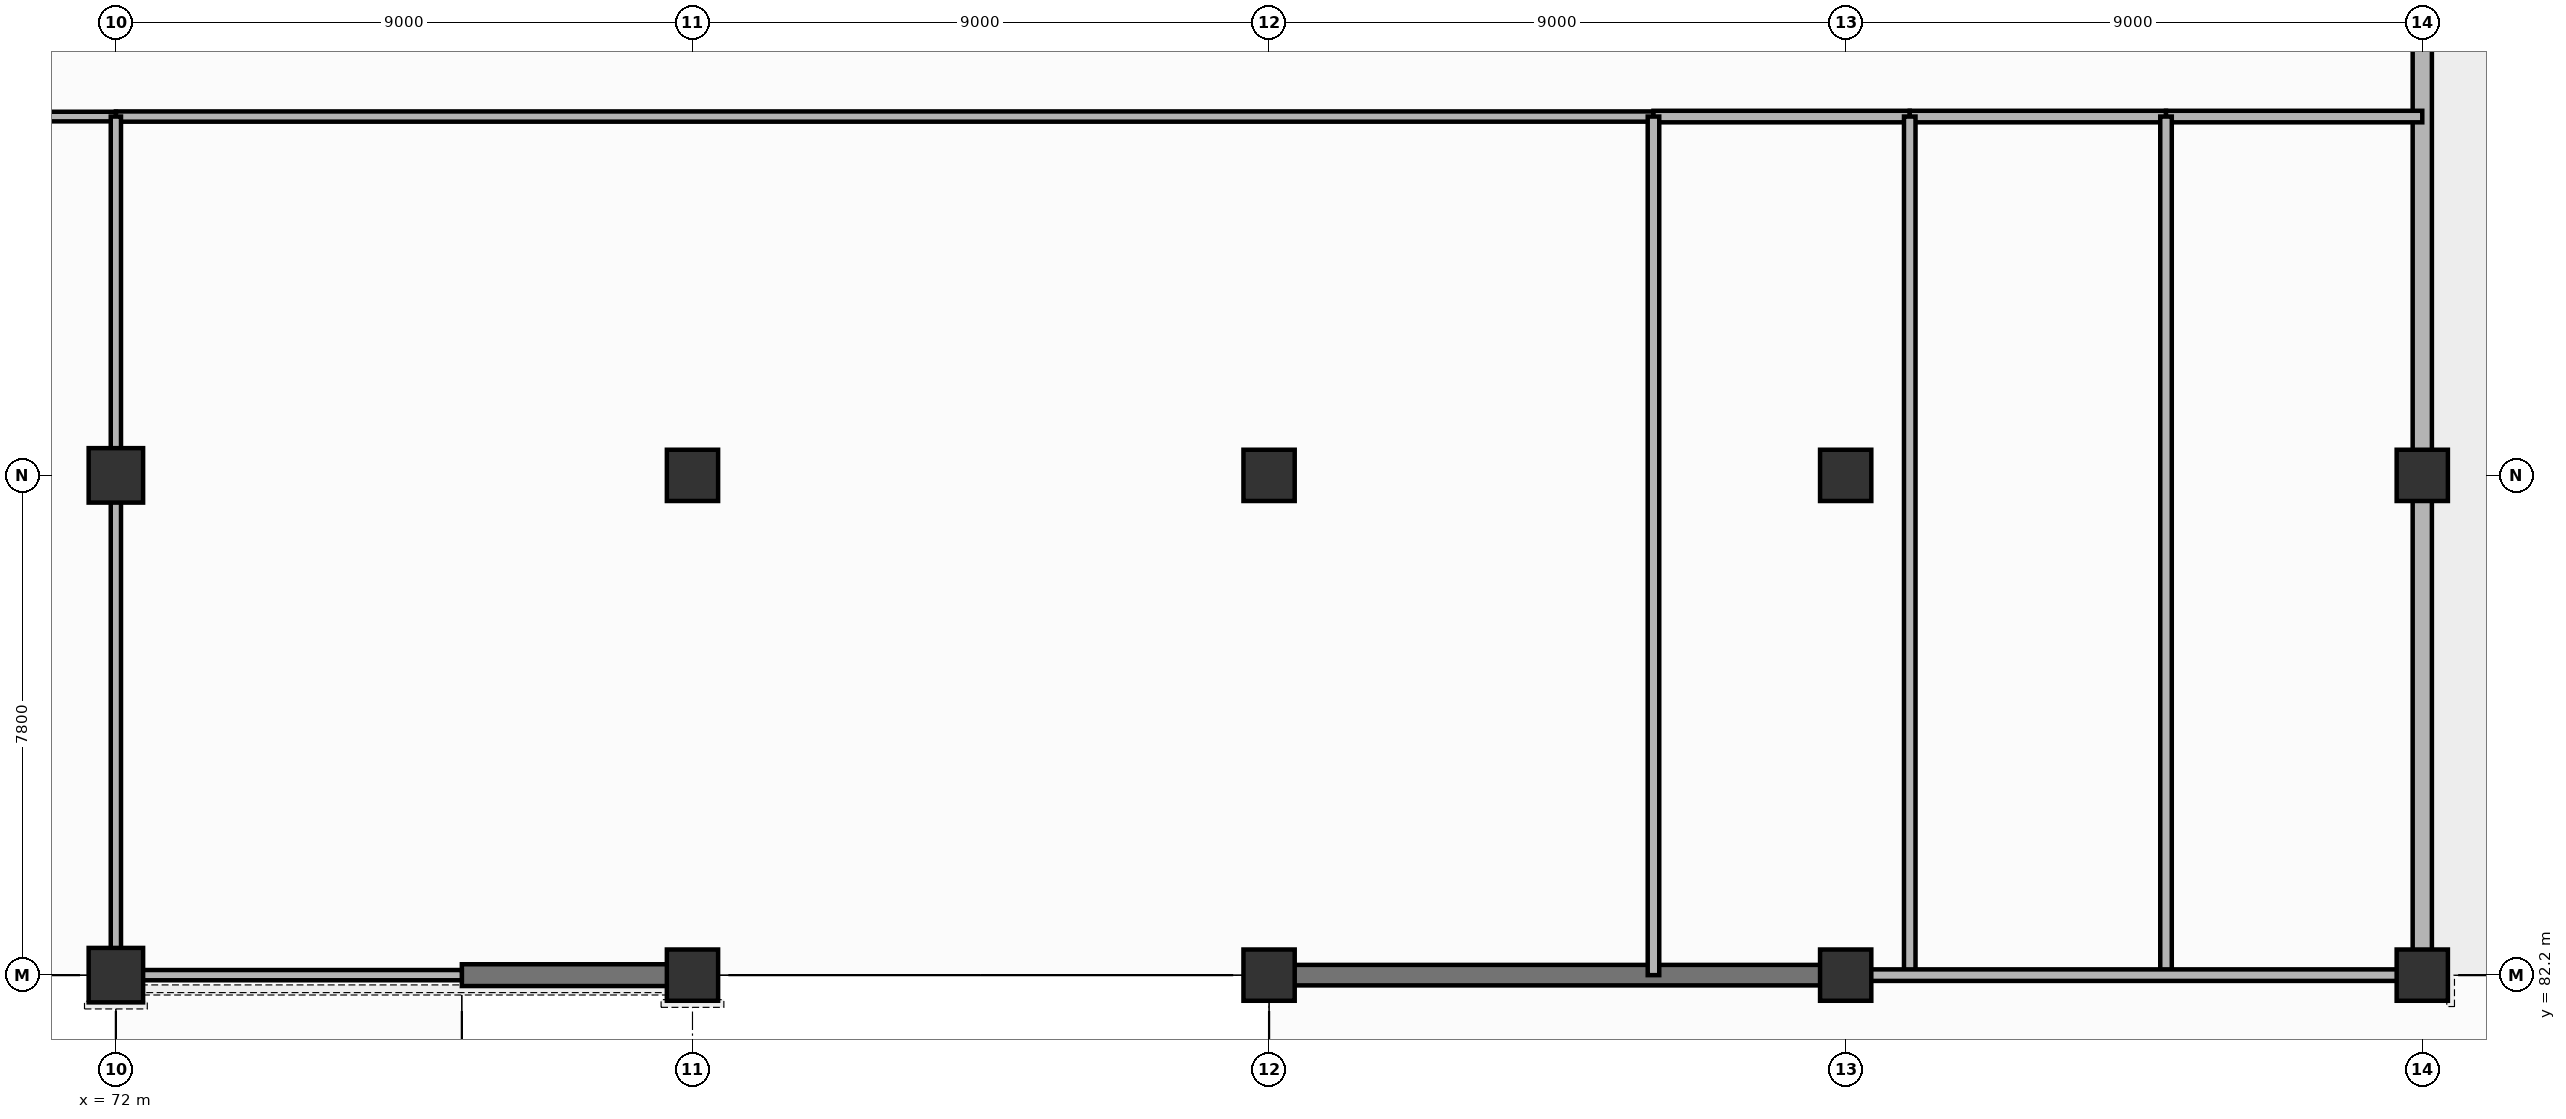
"""IFC4 building model, lengths in metres.
Left out: names, types, materials, properties, quantities, classifications, styles, units other than length and angle.
Written with IfcOpenShell. Run it as: python <this file> out.ifc"""

import sys

from ifc_helpers import new_model, si_unit, direction, frame, frame_2d, origin, origin_2d, place, context, subcontext, project, spatial, rectangle, extrude, element, fill, save


model = new_model("IFC4")
c1 = context("Model", 3, precision=1e-05, world=origin(), true_north=direction((0.0, 1.0)))
c2 = subcontext(c1, "Body", "Model", "MODEL_VIEW")
j1 = project(units=[si_unit("LENGTHUNIT", "METRE"), si_unit("PLANEANGLEUNIT", "RADIAN")], contexts=[c1])
p1 = place(None, origin())
s1 = spatial("IfcSite", under=j1, at=p1, CompositionType="ELEMENT")
p2 = place(p1, origin())
s2 = spatial("IfcBuilding", under=s1, at=p2, CompositionType="ELEMENT")
p3 = place(p2, frame((0.0, 0.0, 5.1)))
s3 = spatial("IfcBuildingStorey", under=s2, at=p3, CompositionType="ELEMENT", Elevation=5.1)
for number, where, z_axis, x_axis in (
    (1, (72.0, 82.2, 0.0), (0.0, 0.0, 1.0), (1.0, 0.0, 0.0)),
    (2, (72.0, 90.0, 0.0), (0.0, 0.0, 1.0), (1.0, 0.0, 0.0)),
):
    element("IfcColumn", number, at=place(p3, frame(where, z_axis=z_axis, x_axis=x_axis)), inside=s3, PredefinedType="COLUMN", context=c2, shape_type="SweptSolid", body=[
        extrude(rectangle(XDim=0.85, YDim=0.85, at=origin_2d()), origin(), (0.0, 0.0, 1.0), 3.84),
    ])
for number, where, z_axis, x_axis in (
    (3, (81.0, 82.2, 0.0), (0.0, 0.0, 1.0), (1.0, 0.0, 0.0)),
    (4, (81.0, 90.0, 0.0), (0.0, 0.0, 1.0), (1.0, 0.0, 0.0)),
    (5, (90.0, 82.2, 0.0), (0.0, 0.0, 1.0), (1.0, 0.0, 0.0)),
    (6, (90.0, 90.0, 0.0), (0.0, 0.0, 1.0), (1.0, 0.0, 0.0)),
    (7, (99.0, 82.2, 0.0), (0.0, 0.0, 1.0), (1.0, 0.0, 0.0)),
    (8, (99.0, 90.0, 0.0), (0.0, 0.0, 1.0), (1.0, 0.0, 0.0)),
    (9, (108.0, 82.2, 0.0), (0.0, 0.0, 1.0), (1.0, 0.0, 0.0)),
    (10, (108.0, 90.0, 0.0), (0.0, 0.0, 1.0), (1.0, 0.0, 0.0)),
):
    element("IfcColumn", number, at=place(p3, frame(where, z_axis=z_axis, x_axis=x_axis)), inside=s3, PredefinedType="COLUMN", context=c2, shape_type="SweptSolid", body=[
        extrude(rectangle(XDim=0.8, YDim=0.8, at=origin_2d()), origin(), (0.0, 0.0, 1.0), 3.84),
    ])
p4 = place(p3, frame((77.4, 82.2, 0.0), z_axis=(0.0, 0.0, 1.0), x_axis=(1.0, 0.0, 0.0)))
e11 = element("IfcWall", 11, at=p4, inside=s3, PredefinedType="SOLIDWALL", context=c2, shape_type="SweptSolid", body=[
    extrude(rectangle(XDim=3.6, YDim=0.34, at=frame_2d((1.8, 0.0))), origin(), (0.0, 0.0, 1.0), 3.55),
])
p5 = place(p3, frame((108.0, 82.2, 0.0), z_axis=(0.0, 0.0, 1.0), x_axis=(0.0, 1.0, 0.0)))
e12 = element("IfcWall", 12, at=p5, inside=s3, PredefinedType="SOLIDWALL", context=c2, shape_type="SweptSolid", body=[
    extrude(rectangle(XDim=31.8, YDim=0.3, at=frame_2d((15.9, 0.0))), origin(), (0.0, 0.0, 1.0), 2.815),
])
p6 = place(p5, frame((3.2, 0.0, 0.595)))
e13 = element("IfcOpeningElement", 13, at=p6, cuts=e12, PredefinedType="OPENING", context=c2, shape_type="SweptSolid", body=[
    extrude(rectangle(XDim=1.5, YDim=2.1, at=frame_2d((0.75, 1.05))), frame((0.0, 0.16, 0.0), z_axis=(0.0, -1.0, 0.0), x_axis=(1.0, 0.0, 0.0)), (0.0, 0.0, 1.0), 0.32),
])
p7 = place(p5, frame((10.5, 0.0, 0.845)))
e14 = element("IfcOpeningElement", 14, at=p7, cuts=e12, PredefinedType="OPENING", context=c2, shape_type="SweptSolid", body=[
    extrude(rectangle(XDim=1.35, YDim=1.85, at=frame_2d((0.675, 0.925))), frame((0.0, 0.16, 0.0), z_axis=(0.0, -1.0, 0.0), x_axis=(1.0, 0.0, 0.0)), (0.0, 0.0, 1.0), 0.32),
])
p8 = place(p3, frame((90.0, 82.2, 0.0), z_axis=(0.0, 0.0, 1.0), x_axis=(1.0, 0.0, 0.0)))
e15 = element("IfcWall", 15, at=p8, inside=s3, PredefinedType="SHEAR", context=c2, shape_type="SweptSolid", body=[
    extrude(rectangle(XDim=9.0, YDim=0.32, at=frame_2d((4.5, 0.0))), origin(), (0.0, 0.0, 1.0), 3.55),
])
p9 = place(p8, frame((3.75, 0.0, 0.0)))
e16 = element("IfcOpeningElement", 16, at=p9, cuts=e15, PredefinedType="OPENING", context=c2, shape_type="SweptSolid", body=[
    extrude(rectangle(XDim=1.5, YDim=2.2, at=frame_2d((0.75, 1.1))), frame((0.0, 0.17, 0.0), z_axis=(0.0, -1.0, 0.0), x_axis=(1.0, 0.0, 0.0)), (0.0, 0.0, 1.0), 0.34),
])
p10 = place(p3, frame((54.0, 95.6, 0.0), z_axis=(0.0, 0.0, 1.0), x_axis=(1.0, 0.0, 0.0)))
e17 = element("IfcWall", 17, at=p10, inside=s3, PredefinedType="PARTITIONING", context=c2, shape_type="SweptSolid", body=[
    extrude(rectangle(XDim=18.0, YDim=0.15, at=frame_2d((9.0, 0.0))), origin(), (0.0, 0.0, 1.0), 2.735),
])
p11 = place(p10, frame((8.5, 0.0, 0.0)))
e18 = element("IfcOpeningElement", 18, at=p11, cuts=e17, PredefinedType="OPENING", context=c2, shape_type="SweptSolid", body=[
    extrude(rectangle(XDim=1.6, YDim=2.2, at=frame_2d((0.8, 1.1))), frame((0.0, 0.085, 0.0), z_axis=(0.0, -1.0, 0.0), x_axis=(1.0, 0.0, 0.0)), (0.0, 0.0, 1.0), 0.17),
])
p12 = place(p3, frame((72.0, 95.6, 0.0), z_axis=(0.0, 0.0, 1.0), x_axis=(1.0, 0.0, 0.0)))
e19 = element("IfcWall", 19, at=p12, inside=s3, PredefinedType="PARTITIONING", context=c2, shape_type="SweptSolid", body=[
    extrude(rectangle(XDim=24.0, YDim=0.16, at=frame_2d((12.0, 0.0))), origin(), (0.0, 0.0, 1.0), 3.55),
])
p13 = place(p12, frame((11.5, 0.0, 0.0)))
e20 = element("IfcOpeningElement", 20, at=p13, cuts=e19, PredefinedType="OPENING", context=c2, shape_type="SweptSolid", body=[
    extrude(rectangle(XDim=1.6, YDim=2.2, at=frame_2d((0.8, 1.1))), frame((0.0, 0.09, 0.0), z_axis=(0.0, -1.0, 0.0), x_axis=(1.0, 0.0, 0.0)), (0.0, 0.0, 1.0), 0.18),
])
p14 = place(p3, frame((72.0, 82.2, 0.0), z_axis=(0.0, 0.0, 1.0), x_axis=(0.0, 1.0, 0.0)))
e21 = element("IfcWall", 21, at=p14, inside=s3, PredefinedType="PARTITIONING", context=c2, shape_type="SweptSolid", body=[
    extrude(rectangle(XDim=13.4, YDim=0.16, at=frame_2d((6.7, 0.0))), origin(), (0.0, 0.0, 1.0), 2.855),
])
p15 = place(p3, frame((96.0, 95.6, 0.0), z_axis=(0.0, 0.0, 1.0), x_axis=(1.0, 0.0, 0.0)))
e22 = element("IfcWall", 22, at=p15, inside=s3, PredefinedType="PLUMBINGWALL", context=c2, shape_type="SweptSolid", body=[
    extrude(rectangle(XDim=4.0, YDim=0.18, at=frame_2d((2.0, 0.0))), origin(), (0.0, 0.0, 1.0), 3.55),
])
p16 = place(p15, frame((1.5, 0.0, 0.0)))
e23 = element("IfcOpeningElement", 23, at=p16, cuts=e22, PredefinedType="OPENING", context=c2, shape_type="SweptSolid", body=[
    extrude(rectangle(XDim=0.95, YDim=2.15, at=frame_2d((0.475, 1.075))), frame((0.0, 0.1, 0.0), z_axis=(0.0, -1.0, 0.0), x_axis=(1.0, 0.0, 0.0)), (0.0, 0.0, 1.0), 0.2),
])
p17 = place(p3, frame((96.0, 82.2, 0.0), z_axis=(0.0, 0.0, 1.0), x_axis=(0.0, 1.0, 0.0)))
e24 = element("IfcWall", 24, at=p17, inside=s3, PredefinedType="PLUMBINGWALL", context=c2, shape_type="SweptSolid", body=[
    extrude(rectangle(XDim=13.4, YDim=0.18, at=frame_2d((6.7, 0.0))), origin(), (0.0, 0.0, 1.0), 3.55),
])
p18 = place(p3, frame((100.0, 95.6, 0.0), z_axis=(0.0, 0.0, 1.0), x_axis=(1.0, 0.0, 0.0)))
e25 = element("IfcWall", 25, at=p18, inside=s3, PredefinedType="PLUMBINGWALL", context=c2, shape_type="SweptSolid", body=[
    extrude(rectangle(XDim=4.0, YDim=0.18, at=frame_2d((2.0, 0.0))), origin(), (0.0, 0.0, 1.0), 3.55),
])
p19 = place(p18, frame((1.5, 0.0, 0.0)))
e26 = element("IfcOpeningElement", 26, at=p19, cuts=e25, PredefinedType="OPENING", context=c2, shape_type="SweptSolid", body=[
    extrude(rectangle(XDim=0.95, YDim=2.15, at=frame_2d((0.475, 1.075))), frame((0.0, 0.1, 0.0), z_axis=(0.0, -1.0, 0.0), x_axis=(1.0, 0.0, 0.0)), (0.0, 0.0, 1.0), 0.2),
])
p20 = place(p3, frame((100.0, 82.2, 0.0), z_axis=(0.0, 0.0, 1.0), x_axis=(0.0, 1.0, 0.0)))
e27 = element("IfcWall", 27, at=p20, inside=s3, PredefinedType="PLUMBINGWALL", context=c2, shape_type="SweptSolid", body=[
    extrude(rectangle(XDim=13.4, YDim=0.18, at=frame_2d((6.7, 0.0))), origin(), (0.0, 0.0, 1.0), 3.55),
])
p21 = place(p3, frame((104.0, 95.6, 0.0), z_axis=(0.0, 0.0, 1.0), x_axis=(1.0, 0.0, 0.0)))
e28 = element("IfcWall", 28, at=p21, inside=s3, PredefinedType="PLUMBINGWALL", context=c2, shape_type="SweptSolid", body=[
    extrude(rectangle(XDim=4.0, YDim=0.18, at=frame_2d((2.0, 0.0))), origin(), (0.0, 0.0, 1.0), 3.55),
])
p22 = place(p21, frame((1.5, 0.0, 0.0)))
e29 = element("IfcOpeningElement", 29, at=p22, cuts=e28, PredefinedType="OPENING", context=c2, shape_type="SweptSolid", body=[
    extrude(rectangle(XDim=0.95, YDim=2.15, at=frame_2d((0.475, 1.075))), frame((0.0, 0.1, 0.0), z_axis=(0.0, -1.0, 0.0), x_axis=(1.0, 0.0, 0.0)), (0.0, 0.0, 1.0), 0.2),
])
p23 = place(p3, frame((104.0, 82.2, 0.0), z_axis=(0.0, 0.0, 1.0), x_axis=(0.0, 1.0, 0.0)))
e30 = element("IfcWall", 30, at=p23, inside=s3, PredefinedType="PLUMBINGWALL", context=c2, shape_type="SweptSolid", body=[
    extrude(rectangle(XDim=13.4, YDim=0.18, at=frame_2d((6.7, 0.0))), origin(), (0.0, 0.0, 1.0), 3.55),
])
p24 = place(p3, frame((99.0, 82.2, 0.0), z_axis=(0.0, 0.0, 1.0), x_axis=(1.0, 0.0, 0.0)))
e31 = element("IfcWall", 31, at=p24, inside=s3, PredefinedType="PLUMBINGWALL", context=c2, shape_type="SweptSolid", body=[
    extrude(rectangle(XDim=9.0, YDim=0.18, at=frame_2d((4.5, 0.0))), origin(), (0.0, 0.0, 1.0), 2.873),
])
p25 = place(p3, frame((72.0, 82.2, 0.0), z_axis=(0.0, 0.0, 1.0), x_axis=(1.0, 0.0, 0.0)))
e32 = element("IfcWall", 32, at=p25, inside=s3, PredefinedType="PARTITIONING", context=c2, shape_type="SweptSolid", body=[
    extrude(rectangle(XDim=5.4, YDim=0.16, at=frame_2d((2.7, 0.0))), origin(), (0.0, 0.0, 1.0), 2.855),
])
p26 = place(p25, frame((1.9, 0.0, 0.0)))
e33 = element("IfcOpeningElement", 33, at=p26, cuts=e32, PredefinedType="OPENING", context=c2, shape_type="SweptSolid", body=[
    extrude(rectangle(XDim=1.6, YDim=2.2, at=frame_2d((0.8, 1.1))), frame((0.0, 0.09, 0.0), z_axis=(0.0, -1.0, 0.0), x_axis=(1.0, 0.0, 0.0)), (0.0, 0.0, 1.0), 0.18),
])
p27 = place(p6, origin())
e34 = element("IfcWindow", 34, at=p27, inside=s3, PartitioningType="SINGLE_PANEL", PredefinedType="WINDOW", context=c2, shape_type="SweptSolid", body=[
    extrude(rectangle(XDim=1.5, YDim=2.1, at=frame_2d((0.75, 1.05))), frame((0.0, 0.03, 0.0), z_axis=(0.0, -1.0, 0.0), x_axis=(1.0, 0.0, 0.0)), (0.0, 0.0, 1.0), 0.06),
])
fill(e13, e34)
p28 = place(p7, origin())
e35 = element("IfcWindow", 35, at=p28, inside=s3, PartitioningType="SINGLE_PANEL", PredefinedType="WINDOW", context=c2, shape_type="SweptSolid", body=[
    extrude(rectangle(XDim=1.35, YDim=1.85, at=frame_2d((0.675, 0.925))), frame((0.0, 0.03, 0.0), z_axis=(0.0, -1.0, 0.0), x_axis=(1.0, 0.0, 0.0)), (0.0, 0.0, 1.0), 0.06),
])
fill(e14, e35)
p29 = place(p9, origin())
e36 = element("IfcDoor", 36, at=p29, inside=s3, OperationType="DOUBLE_DOOR_SINGLE_SWING", PredefinedType="DOOR", context=c2, shape_type="SweptSolid", body=[
    extrude(rectangle(XDim=1.5, YDim=2.2, at=frame_2d((0.75, 1.1))), frame((0.0, 0.025, 0.0), z_axis=(0.0, -1.0, 0.0), x_axis=(1.0, 0.0, 0.0)), (0.0, 0.0, 1.0), 0.05),
])
fill(e16, e36)
p30 = place(p13, origin())
e37 = element("IfcDoor", 37, at=p30, inside=s3, OperationType="DOUBLE_DOOR_SINGLE_SWING", PredefinedType="DOOR", context=c2, shape_type="SweptSolid", body=[
    extrude(rectangle(XDim=1.6, YDim=2.2, at=frame_2d((0.8, 1.1))), frame((0.0, 0.025, 0.0), z_axis=(0.0, -1.0, 0.0), x_axis=(1.0, 0.0, 0.0)), (0.0, 0.0, 1.0), 0.05),
])
fill(e20, e37)
p31 = place(p16, origin())
e38 = element("IfcDoor", 38, at=p31, inside=s3, OperationType="SINGLE_SWING_LEFT", PredefinedType="DOOR", context=c2, shape_type="SweptSolid", body=[
    extrude(rectangle(XDim=0.95, YDim=2.15, at=frame_2d((0.475, 1.075))), frame((0.0, 0.025, 0.0), z_axis=(0.0, -1.0, 0.0), x_axis=(1.0, 0.0, 0.0)), (0.0, 0.0, 1.0), 0.05),
])
fill(e23, e38)
p32 = place(p19, origin())
e39 = element("IfcDoor", 39, at=p32, inside=s3, OperationType="SINGLE_SWING_RIGHT", PredefinedType="DOOR", context=c2, shape_type="SweptSolid", body=[
    extrude(rectangle(XDim=0.95, YDim=2.15, at=frame_2d((0.475, 1.075))), frame((0.0, 0.025, 0.0), z_axis=(0.0, -1.0, 0.0), x_axis=(1.0, 0.0, 0.0)), (0.0, 0.0, 1.0), 0.05),
])
fill(e26, e39)
p33 = place(p22, origin())
e40 = element("IfcDoor", 40, at=p33, inside=s3, OperationType="SINGLE_SWING_LEFT", PredefinedType="DOOR", context=c2, shape_type="SweptSolid", body=[
    extrude(rectangle(XDim=0.95, YDim=2.15, at=frame_2d((0.475, 1.075))), frame((0.0, 0.025, 0.0), z_axis=(0.0, -1.0, 0.0), x_axis=(1.0, 0.0, 0.0)), (0.0, 0.0, 1.0), 0.05),
])
fill(e29, e40)
p34 = place(p26, origin())
e41 = element("IfcDoor", 41, at=p34, inside=s3, OperationType="DOUBLE_DOOR_SINGLE_SWING", PredefinedType="DOOR", context=c2, shape_type="SweptSolid", body=[
    extrude(rectangle(XDim=1.6, YDim=2.2, at=frame_2d((0.8, 1.1))), frame((0.0, 0.025, 0.0), z_axis=(0.0, -1.0, 0.0), x_axis=(1.0, 0.0, 0.0)), (0.0, 0.0, 1.0), 0.05),
])
fill(e33, e41)
save(model, sys.argv[1])
